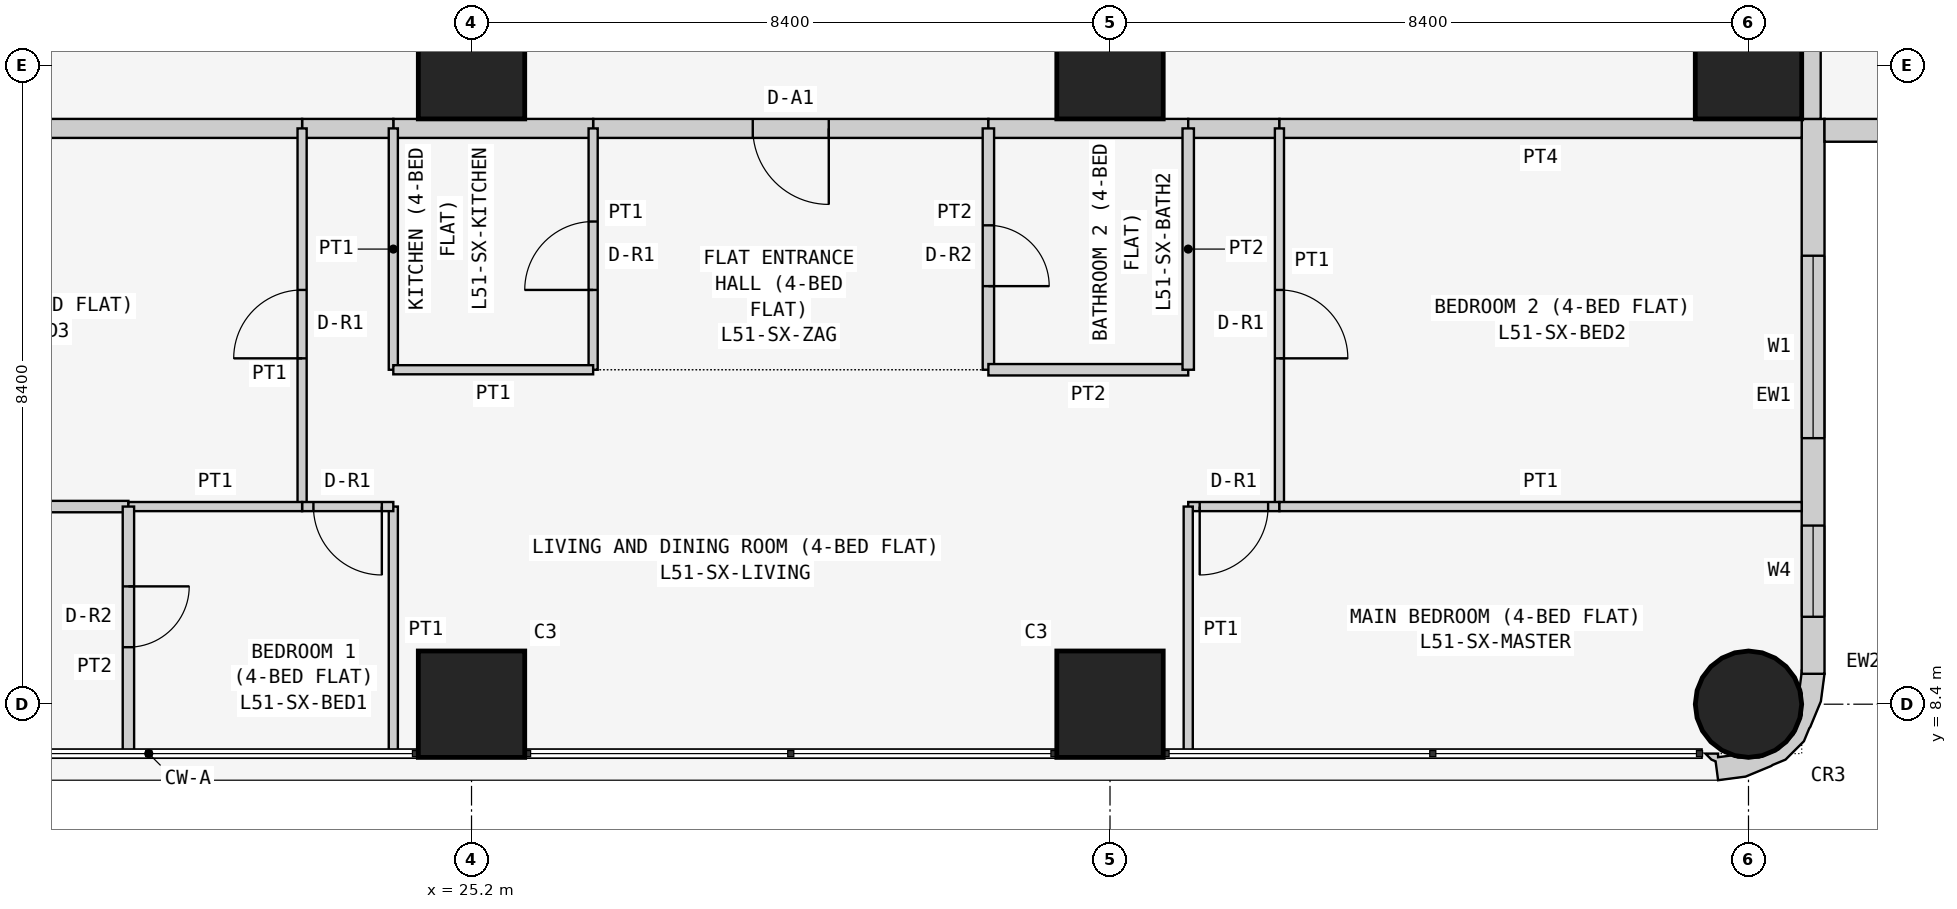
"""IFC4 building model, lengths in metres.
Left out: names, types, materials, properties, quantities, classifications, styles, units other than length and angle.
Written with IfcOpenShell. Run it as: python <this file> out.ifc"""

import sys

from ifc_helpers import new_model, si_unit, direction, frame, frame_2d, origin, origin_2d, place, context, subcontext, project, spatial, polyline, rectangle, circle, outline, extrude, element, fill, save


model = new_model("IFC4")
c1 = context("Model", 3, precision=1e-05, world=origin(), true_north=direction((0.0, 1.0)))
c2 = subcontext(c1, "Body", "Model", "MODEL_VIEW")
j1 = project(units=[si_unit("LENGTHUNIT", "METRE"), si_unit("PLANEANGLEUNIT", "RADIAN")], contexts=[c1])
p1 = place(None, origin())
s1 = spatial("IfcSite", under=j1, at=p1, CompositionType="ELEMENT")
p2 = place(p1, origin())
s2 = spatial("IfcBuilding", under=s1, at=p2, CompositionType="ELEMENT")
p3 = place(p2, frame((0.0, 0.0, 197.7)))
s3 = spatial("IfcBuildingStorey", under=s2, at=p3, CompositionType="ELEMENT", Elevation=197.7)
for number, where, z_axis, x_axis in (
    (1, (25.2, 8.4, 0.0), (0.0, 0.0, 1.0), (1.0, 0.0, 0.0)),
    (2, (25.2, 16.8, 0.0), (0.0, 0.0, 1.0), (1.0, 0.0, 0.0)),
    (3, (33.6, 8.4, 0.0), (0.0, 0.0, 1.0), (1.0, 0.0, 0.0)),
    (4, (33.6, 16.8, 0.0), (0.0, 0.0, 1.0), (1.0, 0.0, 0.0)),
):
    element("IfcColumn", number, at=place(p3, frame(where, z_axis=z_axis, x_axis=x_axis)), inside=s3, PredefinedType="COLUMN", context=c2, shape_type="SweptSolid", body=[
        extrude(rectangle(XDim=1.4, YDim=1.4, at=origin_2d()), origin(), (0.0, 0.0, 1.0), 3.6),
    ])
p4 = place(p3, frame((42.0, 8.4, 0.0), z_axis=(0.0, 0.0, 1.0), x_axis=(1.0, 0.0, 0.0)))
e5 = element("IfcColumn", 5, at=p4, inside=s3, PredefinedType="COLUMN", context=c2, shape_type="SweptSolid", body=[
    extrude(circle(Radius=0.7, at=origin_2d()), origin(), (0.0, 0.0, 1.0), 3.6),
])
p5 = place(p3, frame((42.0, 16.8, 0.0), z_axis=(0.0, 0.0, 1.0), x_axis=(1.0, 0.0, 0.0)))
e6 = element("IfcColumn", 6, at=p5, inside=s3, PredefinedType="COLUMN", context=c2, shape_type="SweptSolid", body=[
    extrude(rectangle(XDim=1.4, YDim=1.4, at=origin_2d()), origin(), (0.0, 0.0, 1.0), 3.6),
])
p6 = place(p3, frame((42.85, 8.8, 0.0), z_axis=(0.0, 0.0, 1.0), x_axis=(0.0, 1.0, 0.0)))
e7 = element("IfcWall", 7, at=p6, inside=s3, PredefinedType="SOLIDWALL", context=c2, shape_type="SweptSolid", body=[
    extrude(rectangle(XDim=7.3, YDim=0.3, at=frame_2d((3.65, 0.0))), origin(), (0.0, 0.0, 1.0), 3.45),
])
p7 = place(p6, frame((3.1, 0.0, 0.9)))
e8 = element("IfcOpeningElement", 8, at=p7, cuts=e7, PredefinedType="OPENING", context=c2, shape_type="SweptSolid", body=[
    extrude(rectangle(XDim=2.4, YDim=1.5, at=frame_2d((1.2, 0.75))), frame((0.0, 0.16, 0.0), z_axis=(0.0, -1.0, 0.0), x_axis=(1.0, 0.0, 0.0)), (0.0, 0.0, 1.0), 0.32),
])
p8 = place(p6, frame((0.75, 0.0, 0.9)))
e9 = element("IfcOpeningElement", 9, at=p8, cuts=e7, PredefinedType="OPENING", context=c2, shape_type="SweptSolid", body=[
    extrude(rectangle(XDim=1.2, YDim=1.5, at=frame_2d((0.6, 0.75))), frame((0.0, 0.16, 0.0), z_axis=(0.0, -1.0, 0.0), x_axis=(1.0, 0.0, 0.0)), (0.0, 0.0, 1.0), 0.32),
])
p9 = place(p3, frame((43.0, 15.95, 0.0), z_axis=(0.0, 0.0, 1.0), x_axis=(1.0, 0.0, 0.0)))
e10 = element("IfcWall", 10, at=p9, inside=s3, PredefinedType="SOLIDWALL", context=c2, shape_type="SweptSolid", body=[
    extrude(rectangle(XDim=7.0, YDim=0.3, at=frame_2d((3.5, 0.0))), origin(), (0.0, 0.0, 1.0), 3.45),
])
p10 = place(p9, frame((1.5, 0.0, 0.9)))
e11 = element("IfcOpeningElement", 11, at=p10, cuts=e10, PredefinedType="OPENING", context=c2, shape_type="SweptSolid", body=[
    extrude(rectangle(XDim=2.4, YDim=1.5, at=frame_2d((1.2, 0.75))), frame((0.0, 0.16, 0.0), z_axis=(0.0, -1.0, 0.0), x_axis=(1.0, 0.0, 0.0)), (0.0, 0.0, 1.0), 0.32),
])
p11 = place(p9, frame((5.05, 0.0, 0.9)))
e12 = element("IfcOpeningElement", 12, at=p11, cuts=e10, PredefinedType="OPENING", context=c2, shape_type="SweptSolid", body=[
    extrude(rectangle(XDim=1.2, YDim=1.5, at=frame_2d((0.6, 0.75))), frame((0.0, 0.16, 0.0), z_axis=(0.0, -1.0, 0.0), x_axis=(1.0, 0.0, 0.0)), (0.0, 0.0, 1.0), 0.32),
])
p12 = place(p3, frame((41.488, 7.812, 0.0), z_axis=(0.0, 0.0, 1.0), x_axis=(0.439933741929, -0.898030234854, 0.0)))
e13 = element("IfcWall", 13, at=p12, inside=s3, PredefinedType="SOLIDWALL", context=c2, shape_type="SweptSolid", body=[
    extrude(outline(polyline([(-0.222, 1.793), (-0.39, 1.541), (-0.372, 1.532), (-0.195, 1.414), (-0.12, 1.41), (0.131, 1.287), (0.315, 1.078), (0.406, 0.814), (0.388, 0.536), (0.265, 0.285), (0.209, 0.235), (0.148, 0.053), (0.105, 0.074), (0.032, -0.076), (0.138, -0.04), (0.182, -0.0), (0.419, -0.08), (0.536, 0.266), (0.559, 0.631), (0.555, 0.651), (0.566, 0.836), (0.455, 1.159), (0.333, 1.298), (0.324, 1.317), (0.082, 1.591), (-0.222, 1.793)])), origin(), (0.0, 0.0, 1.0), 3.45),
])
p13 = place(p3, frame((42.825, 22.971, 0.0), z_axis=(0.0, 0.0, 1.0), x_axis=(0.0, -1.0, 0.0)))
e14 = element("IfcWall", 14, at=p13, inside=s3, PredefinedType="PARTITIONING", context=c2, shape_type="SweptSolid", body=[
    extrude(rectangle(XDim=6.871, YDim=0.25, at=frame_2d((3.436, 0.0))), origin(), (0.0, 0.0, 1.0), 3.45),
])
p14 = place(p3, frame((32.0, 15.975, 0.0), z_axis=(0.0, 0.0, 1.0), x_axis=(-1.0, 0.0, 0.0)))
e15 = element("IfcWall", 15, at=p14, inside=s3, PredefinedType="PARTITIONING", context=c2, shape_type="SweptSolid", body=[
    extrude(rectangle(XDim=5.2, YDim=0.25, at=frame_2d((2.6, 0.0))), origin(), (0.0, 0.0, 1.0), 3.45),
])
p15 = place(p14, frame((2.1, 0.0, 0.0)))
e16 = element("IfcOpeningElement", 16, at=p15, cuts=e15, PredefinedType="OPENING", context=c2, shape_type="SweptSolid", body=[
    extrude(rectangle(XDim=1.0, YDim=2.1, at=frame_2d((0.5, 1.05))), frame((0.0, 0.135, 0.0), z_axis=(0.0, -1.0, 0.0), x_axis=(1.0, 0.0, 0.0)), (0.0, 0.0, 1.0), 0.27),
])
p16 = place(p3, frame((34.629, 15.975, 0.0), z_axis=(0.0, 0.0, 1.0), x_axis=(-1.0, 0.0, 0.0)))
e17 = element("IfcWall", 17, at=p16, inside=s3, PredefinedType="PARTITIONING", context=c2, shape_type="SweptSolid", body=[
    extrude(rectangle(XDim=2.629, YDim=0.25, at=frame_2d((1.314, 0.0))), origin(), (0.0, 0.0, 1.0), 3.45),
])
p17 = place(p3, frame((26.8, 15.975, 0.0), z_axis=(0.0, 0.0, 1.0), x_axis=(-1.0, 0.0, 0.0)))
e18 = element("IfcWall", 18, at=p17, inside=s3, PredefinedType="PARTITIONING", context=c2, shape_type="SweptSolid", body=[
    extrude(rectangle(XDim=2.629, YDim=0.25, at=frame_2d((1.314, 0.0))), origin(), (0.0, 0.0, 1.0), 3.45),
])
p18 = place(p3, frame((24.171, 15.975, 0.0), z_axis=(0.0, 0.0, 1.0), x_axis=(-1.0, 0.0, 0.0)))
e19 = element("IfcWall", 19, at=p18, inside=s3, PredefinedType="PARTITIONING", context=c2, shape_type="SweptSolid", body=[
    extrude(rectangle(XDim=1.2, YDim=0.25, at=frame_2d((0.6, 0.0))), origin(), (0.0, 0.0, 1.0), 3.45),
])
p19 = place(p3, frame((35.829, 15.975, 0.0), z_axis=(0.0, 0.0, 1.0), x_axis=(-1.0, 0.0, 0.0)))
e20 = element("IfcWall", 20, at=p19, inside=s3, PredefinedType="PARTITIONING", context=c2, shape_type="SweptSolid", body=[
    extrude(rectangle(XDim=1.2, YDim=0.25, at=frame_2d((0.6, 0.0))), origin(), (0.0, 0.0, 1.0), 3.45),
])
for number, where, z_axis, x_axis in (
    (21, (42.7, 15.975, 0.0), (0.0, 0.0, 1.0), (-1.0, 0.0, 0.0)),
    (22, (22.971, 15.975, 0.0), (0.0, 0.0, 1.0), (-1.0, 0.0, 0.0)),
):
    element("IfcWall", number, at=place(p3, frame(where, z_axis=z_axis, x_axis=x_axis)), inside=s3, PredefinedType="PARTITIONING", context=c2, shape_type="SweptSolid", body=[
        extrude(rectangle(XDim=6.871, YDim=0.25, at=frame_2d((3.436, 0.0))), origin(), (0.0, 0.0, 1.0), 3.45),
    ])
p20 = place(p3, frame((32.0, 12.8, 0.0), z_axis=(0.0, 0.0, 1.0), x_axis=(0.0, 1.0, 0.0)))
e23 = element("IfcWall", 23, at=p20, inside=s3, PredefinedType="PARTITIONING", context=c2, shape_type="SweptSolid", body=[
    extrude(rectangle(XDim=3.175, YDim=0.15, at=frame_2d((1.587, 0.0))), origin(), (0.0, 0.0, 1.0), 3.45),
])
p21 = place(p20, frame((1.1, 0.0, 0.0)))
e24 = element("IfcOpeningElement", 24, at=p21, cuts=e23, PredefinedType="OPENING", context=c2, shape_type="SweptSolid", body=[
    extrude(rectangle(XDim=0.8, YDim=2.1, at=frame_2d((0.4, 1.05))), frame((0.0, 0.085, 0.0), z_axis=(0.0, -1.0, 0.0), x_axis=(1.0, 0.0, 0.0)), (0.0, 0.0, 1.0), 0.17),
])
p22 = place(p3, frame((26.8, 15.975, 0.0), z_axis=(0.0, 0.0, 1.0), x_axis=(0.0, -1.0, 0.0)))
e25 = element("IfcWall", 25, at=p22, inside=s3, PredefinedType="PARTITIONING", context=c2, shape_type="SweptSolid", body=[
    extrude(rectangle(XDim=3.175, YDim=0.12, at=frame_2d((1.587, 0.0))), origin(), (0.0, 0.0, 1.0), 3.45),
])
p23 = place(p22, frame((1.225, 0.0, 0.0)))
e26 = element("IfcOpeningElement", 26, at=p23, cuts=e25, PredefinedType="OPENING", context=c2, shape_type="SweptSolid", body=[
    extrude(rectangle(XDim=0.9, YDim=2.1, at=frame_2d((0.45, 1.05))), frame((0.0, 0.07, 0.0), z_axis=(0.0, -1.0, 0.0), x_axis=(1.0, 0.0, 0.0)), (0.0, 0.0, 1.0), 0.14),
])
p24 = place(p3, frame((32.0, 12.8, 0.0), z_axis=(0.0, 0.0, 1.0), x_axis=(1.0, 0.0, 0.0)))
e27 = element("IfcWall", 27, at=p24, inside=s3, PredefinedType="PARTITIONING", context=c2, shape_type="SweptSolid", body=[
    extrude(rectangle(XDim=2.629, YDim=0.15, at=frame_2d((1.314, 0.0))), origin(), (0.0, 0.0, 1.0), 3.45),
])
p25 = place(p3, frame((34.629, 12.8, 0.0), z_axis=(0.0, 0.0, 1.0), x_axis=(0.0, 1.0, 0.0)))
e28 = element("IfcWall", 28, at=p25, inside=s3, PredefinedType="PARTITIONING", context=c2, shape_type="SweptSolid", body=[
    extrude(rectangle(XDim=3.175, YDim=0.15, at=frame_2d((1.587, 0.0))), origin(), (0.0, 0.0, 1.0), 3.45),
])
p26 = place(p3, frame((24.171, 15.975, 0.0), z_axis=(0.0, 0.0, 1.0), x_axis=(0.0, -1.0, 0.0)))
e29 = element("IfcWall", 29, at=p26, inside=s3, PredefinedType="PARTITIONING", context=c2, shape_type="SweptSolid", body=[
    extrude(rectangle(XDim=3.175, YDim=0.12, at=frame_2d((1.587, 0.0))), origin(), (0.0, 0.0, 1.0), 3.45),
])
p27 = place(p3, frame((24.171, 12.8, 0.0), z_axis=(0.0, 0.0, 1.0), x_axis=(1.0, 0.0, 0.0)))
e30 = element("IfcWall", 30, at=p27, inside=s3, PredefinedType="PARTITIONING", context=c2, shape_type="SweptSolid", body=[
    extrude(rectangle(XDim=2.629, YDim=0.12, at=frame_2d((1.314, 0.0))), origin(), (0.0, 0.0, 1.0), 3.45),
])
p28 = place(p3, frame((35.829, 15.975, 0.0), z_axis=(0.0, 0.0, 1.0), x_axis=(0.0, -1.0, 0.0)))
e31 = element("IfcWall", 31, at=p28, inside=s3, PredefinedType="PARTITIONING", context=c2, shape_type="SweptSolid", body=[
    extrude(rectangle(XDim=4.975, YDim=0.12, at=frame_2d((2.488, 0.0))), origin(), (0.0, 0.0, 1.0), 3.45),
])
p29 = place(p28, frame((2.125, 0.0, 0.0)))
e32 = element("IfcOpeningElement", 32, at=p29, cuts=e31, PredefinedType="OPENING", context=c2, shape_type="SweptSolid", body=[
    extrude(rectangle(XDim=0.9, YDim=2.1, at=frame_2d((0.45, 1.05))), frame((0.0, 0.07, 0.0), z_axis=(0.0, -1.0, 0.0), x_axis=(1.0, 0.0, 0.0)), (0.0, 0.0, 1.0), 0.14),
])
p30 = place(p3, frame((35.829, 11.0, 0.0), z_axis=(0.0, 0.0, 1.0), x_axis=(-1.0, 0.0, 0.0)))
e33 = element("IfcWall", 33, at=p30, inside=s3, PredefinedType="PARTITIONING", context=c2, shape_type="SweptSolid", body=[
    extrude(rectangle(XDim=1.2, YDim=0.12, at=frame_2d((0.6, 0.0))), origin(), (0.0, 0.0, 1.0), 3.45),
])
p31 = place(p30, frame((0.149, 0.0, 0.0)))
e34 = element("IfcOpeningElement", 34, at=p31, cuts=e33, PredefinedType="OPENING", context=c2, shape_type="SweptSolid", body=[
    extrude(rectangle(XDim=0.9, YDim=2.1, at=frame_2d((0.45, 1.05))), frame((0.0, 0.07, 0.0), z_axis=(0.0, -1.0, 0.0), x_axis=(1.0, 0.0, 0.0)), (0.0, 0.0, 1.0), 0.14),
])
p32 = place(p3, frame((34.629, 11.0, 0.0), z_axis=(0.0, 0.0, 1.0), x_axis=(0.0, -1.0, 0.0)))
e35 = element("IfcWall", 35, at=p32, inside=s3, PredefinedType="PARTITIONING", context=c2, shape_type="SweptSolid", body=[
    extrude(rectangle(XDim=3.25, YDim=0.12, at=frame_2d((1.625, 0.0))), origin(), (0.0, 0.0, 1.0), 3.45),
])
p33 = place(p3, frame((22.971, 11.0, 0.0), z_axis=(0.0, 0.0, 1.0), x_axis=(0.0, 1.0, 0.0)))
e36 = element("IfcWall", 36, at=p33, inside=s3, PredefinedType="PARTITIONING", context=c2, shape_type="SweptSolid", body=[
    extrude(rectangle(XDim=4.975, YDim=0.12, at=frame_2d((2.488, 0.0))), origin(), (0.0, 0.0, 1.0), 3.45),
])
p34 = place(p33, frame((1.95, 0.0, 0.0)))
e37 = element("IfcOpeningElement", 37, at=p34, cuts=e36, PredefinedType="OPENING", context=c2, shape_type="SweptSolid", body=[
    extrude(rectangle(XDim=0.9, YDim=2.1, at=frame_2d((0.45, 1.05))), frame((0.0, 0.07, 0.0), z_axis=(0.0, -1.0, 0.0), x_axis=(1.0, 0.0, 0.0)), (0.0, 0.0, 1.0), 0.14),
])
p35 = place(p3, frame((24.171, 7.75, 0.0), z_axis=(0.0, 0.0, 1.0), x_axis=(0.0, 1.0, 0.0)))
e38 = element("IfcWall", 38, at=p35, inside=s3, PredefinedType="PARTITIONING", context=c2, shape_type="SweptSolid", body=[
    extrude(rectangle(XDim=3.25, YDim=0.12, at=frame_2d((1.625, 0.0))), origin(), (0.0, 0.0, 1.0), 3.45),
])
p36 = place(p3, frame((24.171, 11.0, 0.0), z_axis=(0.0, 0.0, 1.0), x_axis=(-1.0, 0.0, 0.0)))
e39 = element("IfcWall", 39, at=p36, inside=s3, PredefinedType="PARTITIONING", context=c2, shape_type="SweptSolid", body=[
    extrude(rectangle(XDim=1.2, YDim=0.12, at=frame_2d((0.6, 0.0))), origin(), (0.0, 0.0, 1.0), 3.45),
])
p37 = place(p36, frame((0.151, 0.0, 0.0)))
e40 = element("IfcOpeningElement", 40, at=p37, cuts=e39, PredefinedType="OPENING", context=c2, shape_type="SweptSolid", body=[
    extrude(rectangle(XDim=0.9, YDim=2.1, at=frame_2d((0.45, 1.05))), frame((0.0, 0.07, 0.0), z_axis=(0.0, -1.0, 0.0), x_axis=(1.0, 0.0, 0.0)), (0.0, 0.0, 1.0), 0.14),
])
p38 = place(p3, frame((35.829, 11.0, 0.0), z_axis=(0.0, 0.0, 1.0), x_axis=(1.0, 0.0, 0.0)))
e41 = element("IfcWall", 41, at=p38, inside=s3, PredefinedType="PARTITIONING", context=c2, shape_type="SweptSolid", body=[
    extrude(rectangle(XDim=6.871, YDim=0.12, at=frame_2d((3.436, 0.0))), origin(), (0.0, 0.0, 1.0), 3.45),
])
p39 = place(p3, frame((16.1, 11.0, 0.0), z_axis=(0.0, 0.0, 1.0), x_axis=(1.0, 0.0, 0.0)))
e42 = element("IfcWall", 42, at=p39, inside=s3, PredefinedType="PARTITIONING", context=c2, shape_type="SweptSolid", body=[
    extrude(rectangle(XDim=4.586, YDim=0.15, at=frame_2d((2.293, 0.0))), origin(), (0.0, 0.0, 1.0), 3.45),
])
p40 = place(p3, frame((20.686, 11.0, 0.0), z_axis=(0.0, 0.0, 1.0), x_axis=(1.0, 0.0, 0.0)))
e43 = element("IfcWall", 43, at=p40, inside=s3, PredefinedType="PARTITIONING", context=c2, shape_type="SweptSolid", body=[
    extrude(rectangle(XDim=2.285, YDim=0.12, at=frame_2d((1.143, 0.0))), origin(), (0.0, 0.0, 1.0), 3.45),
])
p41 = place(p3, frame((20.686, 7.75, 0.0), z_axis=(0.0, 0.0, 1.0), x_axis=(0.0, 1.0, 0.0)))
e44 = element("IfcWall", 44, at=p41, inside=s3, PredefinedType="PARTITIONING", context=c2, shape_type="SweptSolid", body=[
    extrude(rectangle(XDim=3.25, YDim=0.15, at=frame_2d((1.625, 0.0))), origin(), (0.0, 0.0, 1.0), 3.45),
])
p42 = place(p41, frame((1.4, 0.0, 0.0)))
e45 = element("IfcOpeningElement", 45, at=p42, cuts=e44, PredefinedType="OPENING", context=c2, shape_type="SweptSolid", body=[
    extrude(rectangle(XDim=0.8, YDim=2.1, at=frame_2d((0.4, 1.05))), frame((0.0, 0.085, 0.0), z_axis=(0.0, -1.0, 0.0), x_axis=(1.0, 0.0, 0.0)), (0.0, 0.0, 1.0), 0.17),
])
p43 = place(p7, origin())
e46 = element("IfcWindow", 46, at=p43, inside=s3, PartitioningType="SINGLE_PANEL", PredefinedType="WINDOW", context=c2, shape_type="SweptSolid", body=[
    extrude(rectangle(XDim=2.4, YDim=1.5, at=frame_2d((1.2, 0.75))), frame((0.0, 0.03, 0.0), z_axis=(0.0, -1.0, 0.0), x_axis=(1.0, 0.0, 0.0)), (0.0, 0.0, 1.0), 0.06),
])
fill(e8, e46)
p44 = place(p8, origin())
e47 = element("IfcWindow", 47, at=p44, inside=s3, PartitioningType="SINGLE_PANEL", PredefinedType="WINDOW", context=c2, shape_type="SweptSolid", body=[
    extrude(rectangle(XDim=1.2, YDim=1.5, at=frame_2d((0.6, 0.75))), frame((0.0, 0.03, 0.0), z_axis=(0.0, -1.0, 0.0), x_axis=(1.0, 0.0, 0.0)), (0.0, 0.0, 1.0), 0.06),
])
fill(e9, e47)
p45 = place(p15, origin())
e48 = element("IfcDoor", 48, at=p45, inside=s3, OperationType="SINGLE_SWING_LEFT", PredefinedType="DOOR", context=c2, shape_type="SweptSolid", body=[
    extrude(rectangle(XDim=1.0, YDim=2.1, at=frame_2d((0.5, 1.05))), frame((0.0, 0.025, 0.0), z_axis=(0.0, -1.0, 0.0), x_axis=(1.0, 0.0, 0.0)), (0.0, 0.0, 1.0), 0.05),
])
fill(e16, e48)
p46 = place(p21, frame((0.8, 0.0, 0.0), z_axis=(0.0, 0.0, 1.0), x_axis=(-1.0, 0.0, 0.0)))
e49 = element("IfcDoor", 49, at=p46, inside=s3, OperationType="SINGLE_SWING_RIGHT", PredefinedType="DOOR", context=c2, shape_type="SweptSolid", body=[
    extrude(rectangle(XDim=0.8, YDim=2.1, at=frame_2d((0.4, 1.05))), frame((0.0, 0.025, 0.0), z_axis=(0.0, -1.0, 0.0), x_axis=(1.0, 0.0, 0.0)), (0.0, 0.0, 1.0), 0.05),
])
fill(e24, e49)
p47 = place(p23, frame((0.9, 0.0, 0.0), z_axis=(0.0, 0.0, 1.0), x_axis=(-1.0, 0.0, 0.0)))
e50 = element("IfcDoor", 50, at=p47, inside=s3, OperationType="SINGLE_SWING_LEFT", PredefinedType="DOOR", context=c2, shape_type="SweptSolid", body=[
    extrude(rectangle(XDim=0.9, YDim=2.1, at=frame_2d((0.45, 1.05))), frame((0.0, 0.025, 0.0), z_axis=(0.0, -1.0, 0.0), x_axis=(1.0, 0.0, 0.0)), (0.0, 0.0, 1.0), 0.05),
])
fill(e26, e50)
p48 = place(p29, origin())
e51 = element("IfcDoor", 51, at=p48, inside=s3, OperationType="SINGLE_SWING_RIGHT", PredefinedType="DOOR", context=c2, shape_type="SweptSolid", body=[
    extrude(rectangle(XDim=0.9, YDim=2.1, at=frame_2d((0.45, 1.05))), frame((0.0, 0.025, 0.0), z_axis=(0.0, -1.0, 0.0), x_axis=(1.0, 0.0, 0.0)), (0.0, 0.0, 1.0), 0.05),
])
fill(e32, e51)
p49 = place(p31, origin())
e52 = element("IfcDoor", 52, at=p49, inside=s3, OperationType="SINGLE_SWING_RIGHT", PredefinedType="DOOR", context=c2, shape_type="SweptSolid", body=[
    extrude(rectangle(XDim=0.9, YDim=2.1, at=frame_2d((0.45, 1.05))), frame((0.0, 0.025, 0.0), z_axis=(0.0, -1.0, 0.0), x_axis=(1.0, 0.0, 0.0)), (0.0, 0.0, 1.0), 0.05),
])
fill(e34, e52)
p50 = place(p34, origin())
e53 = element("IfcDoor", 53, at=p50, inside=s3, OperationType="SINGLE_SWING_LEFT", PredefinedType="DOOR", context=c2, shape_type="SweptSolid", body=[
    extrude(rectangle(XDim=0.9, YDim=2.1, at=frame_2d((0.45, 1.05))), frame((0.0, 0.025, 0.0), z_axis=(0.0, -1.0, 0.0), x_axis=(1.0, 0.0, 0.0)), (0.0, 0.0, 1.0), 0.05),
])
fill(e37, e53)
p51 = place(p37, origin())
e54 = element("IfcDoor", 54, at=p51, inside=s3, OperationType="SINGLE_SWING_LEFT", PredefinedType="DOOR", context=c2, shape_type="SweptSolid", body=[
    extrude(rectangle(XDim=0.9, YDim=2.1, at=frame_2d((0.45, 1.05))), frame((0.0, 0.025, 0.0), z_axis=(0.0, -1.0, 0.0), x_axis=(1.0, 0.0, 0.0)), (0.0, 0.0, 1.0), 0.05),
])
fill(e40, e54)
p52 = place(p42, frame((0.8, 0.0, 0.0), z_axis=(0.0, 0.0, 1.0), x_axis=(-1.0, 0.0, 0.0)))
e55 = element("IfcDoor", 55, at=p52, inside=s3, OperationType="SINGLE_SWING_LEFT", PredefinedType="DOOR", context=c2, shape_type="SweptSolid", body=[
    extrude(rectangle(XDim=0.8, YDim=2.1, at=frame_2d((0.4, 1.05))), frame((0.0, 0.025, 0.0), z_axis=(0.0, -1.0, 0.0), x_axis=(1.0, 0.0, 0.0)), (0.0, 0.0, 1.0), 0.05),
])
fill(e45, e55)
save(model, sys.argv[1])
